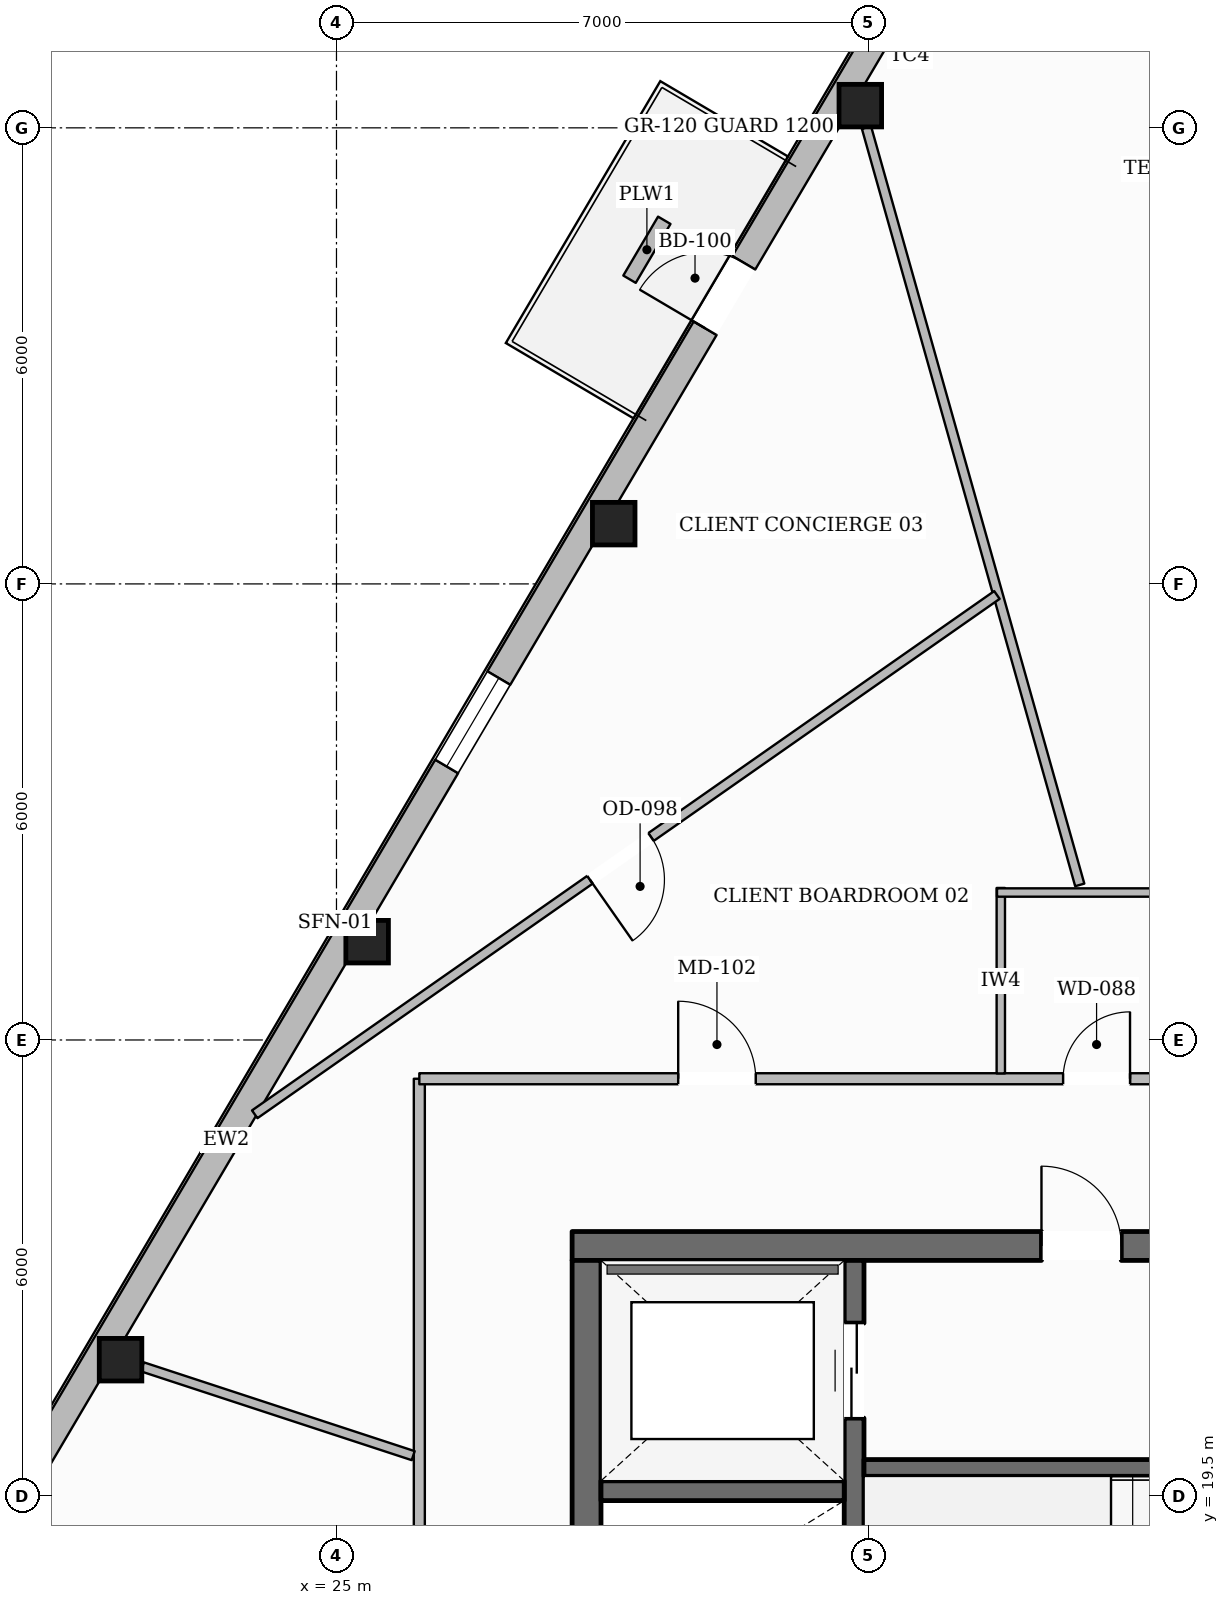
"""IFC4 building model, lengths in metres.
Left out: names, types, materials, properties, quantities, classifications, styles, units other than length and angle.
Written with IfcOpenShell. Run it as: python <this file> out.ifc"""

import sys

from ifc_helpers import new_model, si_unit, direction, frame, frame_2d, origin, origin_2d, place, context, subcontext, project, spatial, rectangle, hollow_rectangle, extrude, element, fill, save


model = new_model("IFC4")
c1 = context("Model", 3, precision=1e-05, world=origin(), true_north=direction((0.0, 1.0)))
c2 = subcontext(c1, "Body", "Model", "MODEL_VIEW")
j1 = project(units=[si_unit("LENGTHUNIT", "METRE"), si_unit("PLANEANGLEUNIT", "RADIAN")], contexts=[c1])
p1 = place(None, origin())
s1 = spatial("IfcSite", under=j1, at=p1, CompositionType="ELEMENT")
p2 = place(p1, origin())
s2 = spatial("IfcBuilding", under=s1, at=p2, CompositionType="ELEMENT")
p3 = place(p2, frame((0.0, 0.0, 285.7)))
s3 = spatial("IfcBuildingStorey", under=s2, at=p3, CompositionType="ELEMENT", Elevation=285.7)
p4 = place(p3, frame((28.1, 22.79, 0.0), z_axis=(0.0, 0.0, 1.0), x_axis=(1.0, 0.0, 0.0)))
e1 = element("IfcWall", 1, at=p4, inside=s3, PredefinedType="SOLIDWALL", context=c2, shape_type="SweptSolid", body=[
    extrude(rectangle(XDim=19.8, YDim=0.38, at=frame_2d((9.9, 0.0))), origin(), (0.0, 0.0, 1.0), 3.61),
])
p5 = place(p4, frame((6.175, 0.0, 0.0)))
e2 = element("IfcOpeningElement", 2, at=p5, cuts=e1, PredefinedType="OPENING", context=c2, shape_type="SweptSolid", body=[
    extrude(rectangle(XDim=1.05, YDim=2.15, at=frame_2d((0.525, 1.075))), frame((0.0, 0.2, 0.0), z_axis=(0.0, -1.0, 0.0), x_axis=(1.0, 0.0, 0.0)), (0.0, 0.0, 1.0), 0.4),
])
p6 = place(p4, frame((12.575, 0.0, 0.0)))
e3 = element("IfcOpeningElement", 3, at=p6, cuts=e1, PredefinedType="OPENING", context=c2, shape_type="SweptSolid", body=[
    extrude(rectangle(XDim=1.05, YDim=2.15, at=frame_2d((0.525, 1.075))), frame((0.0, 0.2, 0.0), z_axis=(0.0, -1.0, 0.0), x_axis=(1.0, 0.0, 0.0)), (0.0, 0.0, 1.0), 0.4),
])
p7 = place(p3, frame((28.29, 9.6, 0.0), z_axis=(0.0, 0.0, 1.0), x_axis=(0.0, 1.0, 0.0)))
e4 = element("IfcWall", 4, at=p7, inside=s3, PredefinedType="SOLIDWALL", context=c2, shape_type="SweptSolid", body=[
    extrude(rectangle(XDim=13.0, YDim=0.38, at=frame_2d((6.5, 0.0))), origin(), (0.0, 0.0, 1.0), 3.61),
])
p8 = place(p7, frame((0.2, 0.0, 0.0)))
e5 = element("IfcOpeningElement", 5, at=p8, cuts=e4, PredefinedType="OPENING", context=c2, shape_type="SweptSolid", body=[
    extrude(rectangle(XDim=1.1, YDim=2.15, at=frame_2d((0.55, 1.075))), frame((0.0, 0.2, 0.0), z_axis=(0.0, -1.0, 0.0), x_axis=(1.0, 0.0, 0.0)), (0.0, 0.0, 1.0), 0.4),
])
p9 = place(p7, frame((8.4, 0.0, 0.0)))
e6 = element("IfcOpeningElement", 6, at=p9, cuts=e4, PredefinedType="OPENING", context=c2, shape_type="SweptSolid", body=[
    extrude(rectangle(XDim=0.9, YDim=2.1, at=frame_2d((0.45, 1.05))), frame((0.0, 0.2, 0.0), z_axis=(0.0, -1.0, 0.0), x_axis=(1.0, 0.0, 0.0)), (0.0, 0.0, 1.0), 0.4),
])
p10 = place(p3, frame((31.81, 9.6, 0.0), z_axis=(0.0, 0.0, 1.0), x_axis=(0.0, 1.0, 0.0)))
e7 = element("IfcWall", 7, at=p10, inside=s3, PredefinedType="SHEAR", context=c2, shape_type="SweptSolid", body=[
    extrude(rectangle(XDim=13.0, YDim=0.26, at=frame_2d((6.5, 0.0))), origin(), (0.0, 0.0, 1.0), 3.61),
])
p11 = place(p10, frame((10.925, 0.0, 0.0)))
e8 = element("IfcOpeningElement", 8, at=p11, cuts=e7, PredefinedType="OPENING", context=c2, shape_type="SweptSolid", body=[
    extrude(rectangle(XDim=1.25, YDim=2.25, at=frame_2d((0.625, 1.125))), frame((0.0, 0.14, 0.0), z_axis=(0.0, -1.0, 0.0), x_axis=(1.0, 0.0, 0.0)), (0.0, 0.0, 1.0), 0.28),
])
p12 = place(p3, frame((28.48, 19.57, 0.0), z_axis=(0.0, 0.0, 1.0), x_axis=(1.0, 0.0, 0.0)))
e9 = element("IfcWall", 9, at=p12, inside=s3, PredefinedType="SHEAR", context=c2, shape_type="SweptSolid", body=[
    extrude(rectangle(XDim=3.2, YDim=0.26, at=frame_2d((1.6, 0.0))), origin(), (0.0, 0.0, 1.0), 3.61),
])
p13 = place(p3, frame((31.94, 19.87, 0.0), z_axis=(0.0, 0.0, 1.0), x_axis=(1.0, 0.0, 0.0)))
e10 = element("IfcWall", 10, at=p13, inside=s3, PredefinedType="SOLIDWALL", context=c2, shape_type="SweptSolid", body=[
    extrude(rectangle(XDim=12.12, YDim=0.22, at=frame_2d((6.06, 0.0))), origin(), (0.0, 0.0, 1.0), 3.61),
])
p14 = place(p13, frame((6.3, 0.0, 0.0)))
e11 = element("IfcOpeningElement", 11, at=p14, cuts=e10, PredefinedType="OPENING", context=c2, shape_type="SweptSolid", body=[
    extrude(rectangle(XDim=1.1, YDim=2.15, at=frame_2d((0.55, 1.075))), frame((0.0, 0.12, 0.0), z_axis=(0.0, -1.0, 0.0), x_axis=(1.0, 0.0, 0.0)), (0.0, 0.0, 1.0), 0.24),
])
p15 = place(p13, frame((8.61, 0.0, 0.0)))
e12 = element("IfcOpeningElement", 12, at=p15, cuts=e10, PredefinedType="OPENING", context=c2, shape_type="SweptSolid", body=[
    extrude(rectangle(XDim=0.9, YDim=2.1, at=frame_2d((0.45, 1.05))), frame((0.0, 0.12, 0.0), z_axis=(0.0, -1.0, 0.0), x_axis=(1.0, 0.0, 0.0)), (0.0, 0.0, 1.0), 0.24),
])
p16 = place(p13, frame((10.85, 0.0, 0.0)))
e13 = element("IfcOpeningElement", 13, at=p16, cuts=e10, PredefinedType="OPENING", context=c2, shape_type="SweptSolid", body=[
    extrude(rectangle(XDim=0.9, YDim=2.1, at=frame_2d((0.45, 1.05))), frame((0.0, 0.12, 0.0), z_axis=(0.0, -1.0, 0.0), x_axis=(1.0, 0.0, 0.0)), (0.0, 0.0, 1.0), 0.24),
])
for number, where, z_axis, x_axis in (
    (14, (31.892, 37.792, 0.0), (0.0, 0.0, 1.0), (1.0, 0.0, 0.0)),
    (15, (28.647, 32.292, 0.0), (0.0, 0.0, 1.0), (1.0, 0.0, 0.0)),
    (16, (25.403, 26.793, 0.0), (0.0, 0.0, 1.0), (1.0, 0.0, 0.0)),
    (17, (22.159, 21.294, 0.0), (0.0, 0.0, 1.0), (1.0, 0.0, 0.0)),
):
    element("IfcColumn", number, at=place(p3, frame(where, z_axis=z_axis, x_axis=x_axis)), inside=s3, PredefinedType="COLUMN", context=c2, shape_type="SweptSolid", body=[
        extrude(hollow_rectangle(XDim=0.56, YDim=0.56, WallThickness=0.025, at=origin_2d()), origin(), (0.0, 0.0, 1.0), 3.61),
    ])
p17 = place(p3, frame((15.195, 10.019, 0.0), z_axis=(0.0, 0.0, 1.0), x_axis=(0.508088294866, 0.861304989316, 0.0)))
e18 = element("IfcWall", 18, at=p17, inside=s3, PredefinedType="STANDARD", context=c2, shape_type="SweptSolid", body=[
    extrude(rectangle(XDim=39.26, YDim=0.35, at=frame_2d((19.63, 0.0))), origin(), (0.0, 0.0, 1.0), 3.196),
])
p18 = place(p17, frame((28.845, 0.0, 0.0)))
e19 = element("IfcOpeningElement", 19, at=p18, cuts=e18, PredefinedType="OPENING", context=c2, shape_type="SweptSolid", body=[
    extrude(rectangle(XDim=1.0, YDim=2.2, at=frame_2d((0.5, 1.1))), frame((0.0, 0.185, 0.0), z_axis=(0.0, -1.0, 0.0), x_axis=(1.0, 0.0, 0.0)), (0.0, 0.0, 1.0), 0.37),
])
p19 = place(p17, frame((34.922, 0.0, 0.65)))
e20 = element("IfcOpeningElement", 20, at=p19, cuts=e18, PredefinedType="OPENING", context=c2, shape_type="SweptSolid", body=[
    extrude(rectangle(XDim=1.35, YDim=1.75, at=frame_2d((0.675, 0.875))), frame((0.0, 0.185, 0.0), z_axis=(0.0, -1.0, 0.0), x_axis=(1.0, 0.0, 0.0)), (0.0, 0.0, 1.0), 0.37),
])
p20 = place(p17, frame((22.152, 0.0, 0.65)))
e21 = element("IfcOpeningElement", 21, at=p20, cuts=e18, PredefinedType="OPENING", context=c2, shape_type="SweptSolid", body=[
    extrude(rectangle(XDim=1.35, YDim=1.75, at=frame_2d((0.675, 0.875))), frame((0.0, 0.185, 0.0), z_axis=(0.0, -1.0, 0.0), x_axis=(1.0, 0.0, 0.0)), (0.0, 0.0, 1.0), 0.37),
])
p21 = place(p17, frame((9.382, 0.0, 0.65)))
e22 = element("IfcOpeningElement", 22, at=p21, cuts=e18, PredefinedType="OPENING", context=c2, shape_type="SweptSolid", body=[
    extrude(rectangle(XDim=1.35, YDim=1.75, at=frame_2d((0.675, 0.875))), frame((0.0, 0.185, 0.0), z_axis=(0.0, -1.0, 0.0), x_axis=(1.0, 0.0, 0.0)), (0.0, 0.0, 1.0), 0.37),
])
p22 = place(p17, frame((2.997, 0.0, 0.65)))
e23 = element("IfcOpeningElement", 23, at=p22, cuts=e18, PredefinedType="OPENING", context=c2, shape_type="SweptSolid", body=[
    extrude(rectangle(XDim=1.35, YDim=1.75, at=frame_2d((0.675, 0.875))), frame((0.0, 0.185, 0.0), z_axis=(0.0, -1.0, 0.0), x_axis=(1.0, 0.0, 0.0)), (0.0, 0.0, 1.0), 0.37),
])
p23 = place(p3, frame((29.312, 36.284, 0.0), z_axis=(0.0, 0.0, 1.0), x_axis=(-0.508098554151, -0.861298937228, 0.0)))
e24 = element("IfcWall", 24, at=p23, inside=s3, PredefinedType="USERDEFINED", context=c2, shape_type="SweptSolid", body=[
    extrude(rectangle(XDim=0.9, YDim=0.19, at=frame_2d((0.45, 0.0))), origin(), (0.0, 0.0, 1.0), 0.5),
])
p24 = place(p3, frame((26.09, 7.21, 0.0), z_axis=(0.0, 0.0, 1.0), x_axis=(0.0, 1.0, 0.0)))
e25 = element("IfcWall", 25, at=p24, inside=s3, PredefinedType="PARTITIONING", context=c2, shape_type="SweptSolid", body=[
    extrude(rectangle(XDim=17.78, YDim=0.145, at=frame_2d((8.89, 0.0))), origin(), (0.0, 0.0, 1.0), 3.349),
])
p25 = place(p24, frame((5.795, 0.0, 0.0)))
e26 = element("IfcOpeningElement", 26, at=p25, cuts=e25, PredefinedType="OPENING", context=c2, shape_type="SweptSolid", body=[
    extrude(rectangle(XDim=1.4, YDim=2.2, at=frame_2d((0.7, 1.1))), frame((0.0, 0.083, 0.0), z_axis=(0.0, -1.0, 0.0), x_axis=(1.0, 0.0, 0.0)), (0.0, 0.0, 1.0), 0.165),
])
p26 = place(p3, frame((26.09, 24.99, 0.0), z_axis=(0.0, 0.0, 1.0), x_axis=(1.0, 0.0, 0.0)))
e27 = element("IfcWall", 27, at=p26, inside=s3, PredefinedType="PARTITIONING", context=c2, shape_type="SweptSolid", body=[
    extrude(rectangle(XDim=17.11, YDim=0.145, at=frame_2d((8.555, 0.0))), origin(), (0.0, 0.0, 1.0), 3.61),
])
p27 = place(p26, frame((8.47, 0.0, 0.0)))
e28 = element("IfcOpeningElement", 28, at=p27, cuts=e27, PredefinedType="OPENING", context=c2, shape_type="SweptSolid", body=[
    extrude(rectangle(XDim=0.88, YDim=2.1, at=frame_2d((0.44, 1.05))), frame((0.0, 0.083, 0.0), z_axis=(0.0, -1.0, 0.0), x_axis=(1.0, 0.0, 0.0)), (0.0, 0.0, 1.0), 0.165),
])
p28 = place(p26, frame((10.99, 0.0, 0.0)))
e29 = element("IfcOpeningElement", 29, at=p28, cuts=e27, PredefinedType="OPENING", context=c2, shape_type="SweptSolid", body=[
    extrude(rectangle(XDim=0.88, YDim=2.1, at=frame_2d((0.44, 1.05))), frame((0.0, 0.083, 0.0), z_axis=(0.0, -1.0, 0.0), x_axis=(1.0, 0.0, 0.0)), (0.0, 0.0, 1.0), 0.165),
])
p29 = place(p26, frame((13.37, 0.0, 0.0)))
e30 = element("IfcOpeningElement", 30, at=p29, cuts=e27, PredefinedType="OPENING", context=c2, shape_type="SweptSolid", body=[
    extrude(rectangle(XDim=0.96, YDim=2.1, at=frame_2d((0.48, 1.05))), frame((0.0, 0.083, 0.0), z_axis=(0.0, -1.0, 0.0), x_axis=(1.0, 0.0, 0.0)), (0.0, 0.0, 1.0), 0.165),
])
p30 = place(p26, frame((3.406, 0.0, 0.0)))
e31 = element("IfcOpeningElement", 31, at=p30, cuts=e27, PredefinedType="OPENING", context=c2, shape_type="SweptSolid", body=[
    extrude(rectangle(XDim=1.02, YDim=2.15, at=frame_2d((0.51, 1.075))), frame((0.0, 0.083, 0.0), z_axis=(0.0, -1.0, 0.0), x_axis=(1.0, 0.0, 0.0)), (0.0, 0.0, 1.0), 0.165),
])
p31 = place(p3, frame((33.74, 25.06, 0.0), z_axis=(0.0, 0.0, 1.0), x_axis=(0.0, 1.0, 0.0)))
e32 = element("IfcWall", 32, at=p31, inside=s3, PredefinedType="PLUMBINGWALL", context=c2, shape_type="SweptSolid", body=[
    extrude(rectangle(XDim=2.44, YDim=0.11, at=frame_2d((1.22, 0.0))), origin(), (0.0, 0.0, 1.0), 3.61),
])
p32 = place(p3, frame((33.69, 27.44, 0.0), z_axis=(0.0, 0.0, 1.0), x_axis=(1.0, 0.0, 0.0)))
e33 = element("IfcWall", 33, at=p32, inside=s3, PredefinedType="PLUMBINGWALL", context=c2, shape_type="SweptSolid", body=[
    extrude(rectangle(XDim=7.46, YDim=0.11, at=frame_2d((3.73, 0.0))), origin(), (0.0, 0.0, 1.0), 3.61),
])
p33 = place(p3, frame((34.779, 27.54, 0.0), z_axis=(0.0, 0.0, 1.0), x_axis=(-0.271059057767, 0.962562718581, 0.0)))
e34 = element("IfcWall", 34, at=p33, inside=s3, PredefinedType="PARTITIONING", context=c2, shape_type="SweptSolid", body=[
    extrude(rectangle(XDim=10.352, YDim=0.125, at=frame_2d((5.176, 0.0))), origin(), (0.0, 0.0, 1.0), 3.61),
])
p34 = place(p3, frame((26.01, 20.031, 0.0), z_axis=(0.0, 0.0, 1.0), x_axis=(-0.950228276724, 0.311554525108, 0.0)))
e35 = element("IfcWall", 35, at=p34, inside=s3, PredefinedType="PARTITIONING", context=c2, shape_type="SweptSolid", body=[
    extrude(rectangle(XDim=3.749, YDim=0.125, at=frame_2d((1.875, 0.0))), origin(), (0.0, 0.0, 1.0), 3.61),
])
p35 = place(p3, frame((33.689, 31.354, 0.0), z_axis=(0.0, 0.0, 1.0), x_axis=(-0.819358941252, -0.573280843384, 0.0)))
e36 = element("IfcWall", 36, at=p35, inside=s3, PredefinedType="PARTITIONING", context=c2, shape_type="SweptSolid", body=[
    extrude(rectangle(XDim=11.917, YDim=0.125, at=frame_2d((5.959, 0.0))), origin(), (0.0, 0.0, 1.0), 3.199),
])
p36 = place(p35, frame((5.554, 0.0, 0.0)))
e37 = element("IfcOpeningElement", 37, at=p36, cuts=e36, PredefinedType="OPENING", context=c2, shape_type="SweptSolid", body=[
    extrude(rectangle(XDim=0.98, YDim=2.15, at=frame_2d((0.49, 1.075))), frame((0.0, 0.073, 0.0), z_axis=(0.0, -1.0, 0.0), x_axis=(1.0, 0.0, 0.0)), (0.0, 0.0, 1.0), 0.145),
])
p37 = place(p18, origin())
e38 = element("IfcDoor", 38, at=p37, inside=s3, OperationType="SINGLE_SWING_LEFT", PredefinedType="DOOR", context=c2, shape_type="SweptSolid", body=[
    extrude(rectangle(XDim=1.0, YDim=2.2, at=frame_2d((0.5, 1.1))), frame((0.0, 0.025, 0.0), z_axis=(0.0, -1.0, 0.0), x_axis=(1.0, 0.0, 0.0)), (0.0, 0.0, 1.0), 0.05),
])
fill(e19, e38)
p38 = place(p20, origin())
e39 = element("IfcWindow", 39, at=p38, inside=s3, PartitioningType="SINGLE_PANEL", PredefinedType="WINDOW", context=c2, shape_type="SweptSolid", body=[
    extrude(rectangle(XDim=1.35, YDim=1.75, at=frame_2d((0.675, 0.875))), frame((0.0, 0.03, 0.0), z_axis=(0.0, -1.0, 0.0), x_axis=(1.0, 0.0, 0.0)), (0.0, 0.0, 1.0), 0.06),
])
fill(e21, e39)
p39 = place(p5, origin())
e40 = element("IfcDoor", 40, at=p39, inside=s3, OperationType="SINGLE_SWING_LEFT", PredefinedType="DOOR", context=c2, shape_type="SweptSolid", body=[
    extrude(rectangle(XDim=1.05, YDim=2.15, at=frame_2d((0.525, 1.075))), frame((0.0, 0.025, 0.0), z_axis=(0.0, -1.0, 0.0), x_axis=(1.0, 0.0, 0.0)), (0.0, 0.0, 1.0), 0.05),
])
fill(e2, e40)
p40 = place(p11, origin())
e41 = element("IfcDoor", 41, at=p40, inside=s3, OperationType="DOUBLE_DOOR_SLIDING", PredefinedType="DOOR", context=c2, shape_type="SweptSolid", body=[
    extrude(rectangle(XDim=1.25, YDim=2.25, at=frame_2d((0.625, 1.125))), frame((0.0, 0.025, 0.0), z_axis=(0.0, -1.0, 0.0), x_axis=(1.0, 0.0, 0.0)), (0.0, 0.0, 1.0), 0.05),
])
fill(e8, e41)
p41 = place(p27, origin())
e42 = element("IfcDoor", 42, at=p41, inside=s3, OperationType="SINGLE_SWING_RIGHT", PredefinedType="DOOR", context=c2, shape_type="SweptSolid", body=[
    extrude(rectangle(XDim=0.88, YDim=2.1, at=frame_2d((0.44, 1.05))), frame((0.0, 0.025, 0.0), z_axis=(0.0, -1.0, 0.0), x_axis=(1.0, 0.0, 0.0)), (0.0, 0.0, 1.0), 0.05),
])
fill(e28, e42)
p42 = place(p30, origin())
e43 = element("IfcDoor", 43, at=p42, inside=s3, OperationType="SINGLE_SWING_LEFT", PredefinedType="DOOR", context=c2, shape_type="SweptSolid", body=[
    extrude(rectangle(XDim=1.02, YDim=2.15, at=frame_2d((0.51, 1.075))), frame((0.0, 0.025, 0.0), z_axis=(0.0, -1.0, 0.0), x_axis=(1.0, 0.0, 0.0)), (0.0, 0.0, 1.0), 0.05),
])
fill(e31, e43)
p43 = place(p36, origin())
e44 = element("IfcDoor", 44, at=p43, inside=s3, OperationType="SINGLE_SWING_RIGHT", PredefinedType="DOOR", context=c2, shape_type="SweptSolid", body=[
    extrude(rectangle(XDim=0.98, YDim=2.15, at=frame_2d((0.49, 1.075))), frame((0.0, 0.025, 0.0), z_axis=(0.0, -1.0, 0.0), x_axis=(1.0, 0.0, 0.0)), (0.0, 0.0, 1.0), 0.05),
])
fill(e37, e44)
save(model, sys.argv[1])
